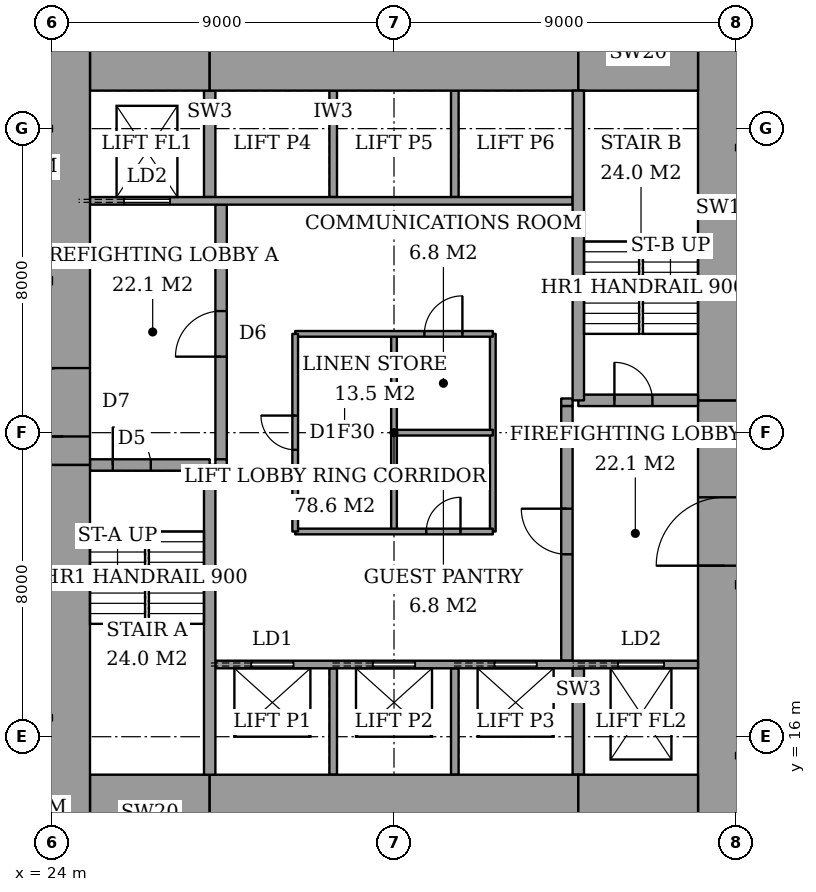
"""IFC4 building model, lengths in metres.
Left out: names, types, materials, properties, quantities, classifications, styles, units other than length and angle.
Written with IfcOpenShell. Run it as: python <this file> out.ifc"""

import sys

from ifc_helpers import new_model, si_unit, direction, frame, frame_2d, origin, place, context, subcontext, project, spatial, rectangle, extrude, element, fill, save


model = new_model("IFC4")
c1 = context("Model", 3, precision=1e-05, world=origin(), true_north=direction((0.0, 1.0)))
c2 = subcontext(c1, "Body", "Model", "MODEL_VIEW")
j1 = project(units=[si_unit("LENGTHUNIT", "METRE"), si_unit("PLANEANGLEUNIT", "RADIAN")], contexts=[c1])
p1 = place(None, origin())
s1 = spatial("IfcSite", under=j1, at=p1, CompositionType="ELEMENT")
p2 = place(p1, origin())
s2 = spatial("IfcBuilding", under=s1, at=p2, CompositionType="ELEMENT")
p3 = place(p2, frame((0.0, 0.0, 103.4)))
s3 = spatial("IfcBuildingStorey", under=s2, at=p3, CompositionType="ELEMENT", Elevation=103.4)
p4 = place(p3, frame((25.0, 14.0, 0.0), z_axis=(0.0, 0.0, 1.0), x_axis=(1.0, 0.0, 0.0)))
e1 = element("IfcWall", 1, at=p4, inside=s3, PredefinedType="SHEAR", context=c2, shape_type="SweptSolid", body=[
    extrude(rectangle(XDim=3.15, YDim=2.0, at=frame_2d((1.575, 0.0))), origin(), (0.0, 0.0, 1.0), 3.6),
])
p5 = place(p3, frame((28.15, 14.0, 0.0), z_axis=(0.0, 0.0, 1.0), x_axis=(1.0, 0.0, 0.0)))
e2 = element("IfcWall", 2, at=p5, inside=s3, PredefinedType="SHEAR", context=c2, shape_type="SweptSolid", body=[
    extrude(rectangle(XDim=9.7, YDim=2.0, at=frame_2d((4.85, 0.0))), origin(), (0.0, 0.0, 1.0), 3.6),
])
for number, where, z_axis, x_axis in (
    (3, (37.85, 14.0, 0.0), (0.0, 0.0, 1.0), (1.0, 0.0, 0.0)),
    (4, (25.0, 34.0, 0.0), (0.0, 0.0, 1.0), (1.0, 0.0, 0.0)),
):
    element("IfcWall", number, at=place(p3, frame(where, z_axis=z_axis, x_axis=x_axis)), inside=s3, PredefinedType="SHEAR", context=c2, shape_type="SweptSolid", body=[
        extrude(rectangle(XDim=3.15, YDim=2.0, at=frame_2d((1.575, 0.0))), origin(), (0.0, 0.0, 1.0), 3.6),
    ])
p6 = place(p3, frame((28.15, 34.0, 0.0), z_axis=(0.0, 0.0, 1.0), x_axis=(1.0, 0.0, 0.0)))
e5 = element("IfcWall", 5, at=p6, inside=s3, PredefinedType="SHEAR", context=c2, shape_type="SweptSolid", body=[
    extrude(rectangle(XDim=9.7, YDim=2.0, at=frame_2d((4.85, 0.0))), origin(), (0.0, 0.0, 1.0), 3.6),
])
p7 = place(p3, frame((37.85, 34.0, 0.0), z_axis=(0.0, 0.0, 1.0), x_axis=(1.0, 0.0, 0.0)))
e6 = element("IfcWall", 6, at=p7, inside=s3, PredefinedType="SHEAR", context=c2, shape_type="SweptSolid", body=[
    extrude(rectangle(XDim=3.15, YDim=2.0, at=frame_2d((1.575, 0.0))), origin(), (0.0, 0.0, 1.0), 3.6),
])
p8 = place(p3, frame((24.3, 13.0, 0.0), z_axis=(0.0, 0.0, 1.0), x_axis=(0.0, 1.0, 0.0)))
e7 = element("IfcWall", 7, at=p8, inside=s3, PredefinedType="SHEAR", context=c2, shape_type="SweptSolid", body=[
    extrude(rectangle(XDim=10.15, YDim=1.4, at=frame_2d((5.075, 0.0))), origin(), (0.0, 0.0, 1.0), 3.6),
])
p9 = place(p3, frame((24.3, 23.15, 0.0), z_axis=(0.0, 0.0, 1.0), x_axis=(0.0, 1.0, 0.0)))
e8 = element("IfcWall", 8, at=p9, inside=s3, PredefinedType="SHEAR", context=c2, shape_type="SweptSolid", body=[
    extrude(rectangle(XDim=11.85, YDim=1.4, at=frame_2d((5.925, 0.0))), origin(), (0.0, 0.0, 1.0), 3.6),
])
p10 = place(p9, frame((0.75, 0.0, 0.0)))
e9 = element("IfcOpeningElement", 9, at=p10, cuts=e8, PredefinedType="OPENING", context=c2, shape_type="SweptSolid", body=[
    extrude(rectangle(XDim=1.8, YDim=2.4, at=frame_2d((0.9, 1.2))), frame((0.0, 0.71, 0.0), z_axis=(0.0, -1.0, 0.0), x_axis=(1.0, 0.0, 0.0)), (0.0, 0.0, 1.0), 1.42),
])
p11 = place(p3, frame((41.7, 13.0, 0.0), z_axis=(0.0, 0.0, 1.0), x_axis=(0.0, 1.0, 0.0)))
e10 = element("IfcWall", 10, at=p11, inside=s3, PredefinedType="SHEAR", context=c2, shape_type="SweptSolid", body=[
    extrude(rectangle(XDim=11.85, YDim=1.4, at=frame_2d((5.925, 0.0))), origin(), (0.0, 0.0, 1.0), 3.6),
])
p12 = place(p11, frame((7.5, 0.0, 0.0)))
e11 = element("IfcOpeningElement", 11, at=p12, cuts=e10, PredefinedType="OPENING", context=c2, shape_type="SweptSolid", body=[
    extrude(rectangle(XDim=1.8, YDim=2.4, at=frame_2d((0.9, 1.2))), frame((0.0, 0.71, 0.0), z_axis=(0.0, -1.0, 0.0), x_axis=(1.0, 0.0, 0.0)), (0.0, 0.0, 1.0), 1.42),
])
p13 = place(p3, frame((41.7, 24.85, 0.0), z_axis=(0.0, 0.0, 1.0), x_axis=(0.0, 1.0, 0.0)))
e12 = element("IfcWall", 12, at=p13, inside=s3, PredefinedType="SHEAR", context=c2, shape_type="SweptSolid", body=[
    extrude(rectangle(XDim=10.15, YDim=1.4, at=frame_2d((5.075, 0.0))), origin(), (0.0, 0.0, 1.0), 3.6),
])
p14 = place(p3, frame((28.15, 15.0, 0.0), z_axis=(0.0, 0.0, 1.0), x_axis=(0.0, 1.0, 0.0)))
e13 = element("IfcWall", 13, at=p14, inside=s3, PredefinedType="SHEAR", context=c2, shape_type="SweptSolid", body=[
    extrude(rectangle(XDim=8.15, YDim=0.3, at=frame_2d((4.075, 0.0))), origin(), (0.0, 0.0, 1.0), 3.6),
])
p15 = place(p3, frame((25.0, 23.15, 0.0), z_axis=(0.0, 0.0, 1.0), x_axis=(1.0, 0.0, 0.0)))
e14 = element("IfcWall", 14, at=p15, inside=s3, PredefinedType="SHEAR", context=c2, shape_type="SweptSolid", body=[
    extrude(rectangle(XDim=3.15, YDim=0.3, at=frame_2d((1.575, 0.0))), origin(), (0.0, 0.0, 1.0), 3.6),
])
p16 = place(p15, frame((0.6, 0.0, 0.0)))
e15 = element("IfcOpeningElement", 15, at=p16, cuts=e14, PredefinedType="OPENING", context=c2, shape_type="SweptSolid", body=[
    extrude(rectangle(XDim=1.0, YDim=2.1, at=frame_2d((0.5, 1.05))), frame((0.0, 0.16, 0.0), z_axis=(0.0, -1.0, 0.0), x_axis=(1.0, 0.0, 0.0)), (0.0, 0.0, 1.0), 0.32),
])
p17 = place(p3, frame((37.85, 24.85, 0.0), z_axis=(0.0, 0.0, 1.0), x_axis=(0.0, 1.0, 0.0)))
e16 = element("IfcWall", 16, at=p17, inside=s3, PredefinedType="SHEAR", context=c2, shape_type="SweptSolid", body=[
    extrude(rectangle(XDim=8.15, YDim=0.3, at=frame_2d((4.075, 0.0))), origin(), (0.0, 0.0, 1.0), 3.6),
])
p18 = place(p3, frame((37.85, 24.85, 0.0), z_axis=(0.0, 0.0, 1.0), x_axis=(1.0, 0.0, 0.0)))
e17 = element("IfcWall", 17, at=p18, inside=s3, PredefinedType="SHEAR", context=c2, shape_type="SweptSolid", body=[
    extrude(rectangle(XDim=3.15, YDim=0.3, at=frame_2d((1.575, 0.0))), origin(), (0.0, 0.0, 1.0), 3.6),
])
p19 = place(p18, frame((0.95, 0.0, 0.0)))
e18 = element("IfcOpeningElement", 18, at=p19, cuts=e17, PredefinedType="OPENING", context=c2, shape_type="SweptSolid", body=[
    extrude(rectangle(XDim=1.0, YDim=2.1, at=frame_2d((0.5, 1.05))), frame((0.0, 0.16, 0.0), z_axis=(0.0, -1.0, 0.0), x_axis=(1.0, 0.0, 0.0)), (0.0, 0.0, 1.0), 0.32),
])
p20 = place(p3, frame((28.45, 23.3, 0.0), z_axis=(0.0, 0.0, 1.0), x_axis=(0.0, 1.0, 0.0)))
e19 = element("IfcWall", 19, at=p20, inside=s3, PredefinedType="PARTITIONING", context=c2, shape_type="SweptSolid", body=[
    extrude(rectangle(XDim=6.7, YDim=0.3, at=frame_2d((3.35, 0.0))), origin(), (0.0, 0.0, 1.0), 3.6),
])
p21 = place(p20, frame((2.7, 0.0, 0.0)))
e20 = element("IfcOpeningElement", 20, at=p21, cuts=e19, PredefinedType="OPENING", context=c2, shape_type="SweptSolid", body=[
    extrude(rectangle(XDim=1.2, YDim=2.1, at=frame_2d((0.6, 1.05))), frame((0.0, 0.16, 0.0), z_axis=(0.0, -1.0, 0.0), x_axis=(1.0, 0.0, 0.0)), (0.0, 0.0, 1.0), 0.32),
])
p22 = place(p3, frame((37.55, 18.0, 0.0), z_axis=(0.0, 0.0, 1.0), x_axis=(0.0, 1.0, 0.0)))
e21 = element("IfcWall", 21, at=p22, inside=s3, PredefinedType="PARTITIONING", context=c2, shape_type="SweptSolid", body=[
    extrude(rectangle(XDim=6.7, YDim=0.3, at=frame_2d((3.35, 0.0))), origin(), (0.0, 0.0, 1.0), 3.6),
])
p23 = place(p22, frame((2.8, 0.0, 0.0)))
e22 = element("IfcOpeningElement", 22, at=p23, cuts=e21, PredefinedType="OPENING", context=c2, shape_type="SweptSolid", body=[
    extrude(rectangle(XDim=1.2, YDim=2.1, at=frame_2d((0.6, 1.05))), frame((0.0, 0.16, 0.0), z_axis=(0.0, -1.0, 0.0), x_axis=(1.0, 0.0, 0.0)), (0.0, 0.0, 1.0), 0.32),
])
p24 = place(p3, frame((28.3, 17.9, 0.0), z_axis=(0.0, 0.0, 1.0), x_axis=(1.0, 0.0, 0.0)))
e23 = element("IfcWall", 23, at=p24, inside=s3, PredefinedType="PARTITIONING", context=c2, shape_type="SweptSolid", body=[
    extrude(rectangle(XDim=12.7, YDim=0.2, at=frame_2d((6.35, 0.0))), origin(), (0.0, 0.0, 1.0), 3.6),
])
p25 = place(p24, frame((0.95, 0.0, 0.0)))
e24 = element("IfcOpeningElement", 24, at=p25, cuts=e23, PredefinedType="OPENING", context=c2, shape_type="SweptSolid", body=[
    extrude(rectangle(XDim=1.1, YDim=2.1, at=frame_2d((0.55, 1.05))), frame((0.0, 0.11, 0.0), z_axis=(0.0, -1.0, 0.0), x_axis=(1.0, 0.0, 0.0)), (0.0, 0.0, 1.0), 0.22),
])
p26 = place(p24, frame((4.15, 0.0, 0.0)))
e25 = element("IfcOpeningElement", 25, at=p26, cuts=e23, PredefinedType="OPENING", context=c2, shape_type="SweptSolid", body=[
    extrude(rectangle(XDim=1.1, YDim=2.1, at=frame_2d((0.55, 1.05))), frame((0.0, 0.11, 0.0), z_axis=(0.0, -1.0, 0.0), x_axis=(1.0, 0.0, 0.0)), (0.0, 0.0, 1.0), 0.22),
])
p27 = place(p24, frame((7.35, 0.0, 0.0)))
e26 = element("IfcOpeningElement", 26, at=p27, cuts=e23, PredefinedType="OPENING", context=c2, shape_type="SweptSolid", body=[
    extrude(rectangle(XDim=1.1, YDim=2.1, at=frame_2d((0.55, 1.05))), frame((0.0, 0.11, 0.0), z_axis=(0.0, -1.0, 0.0), x_axis=(1.0, 0.0, 0.0)), (0.0, 0.0, 1.0), 0.22),
])
p28 = place(p24, frame((10.6, 0.0, 0.0)))
e27 = element("IfcOpeningElement", 27, at=p28, cuts=e23, PredefinedType="OPENING", context=c2, shape_type="SweptSolid", body=[
    extrude(rectangle(XDim=1.2, YDim=2.1, at=frame_2d((0.6, 1.05))), frame((0.0, 0.11, 0.0), z_axis=(0.0, -1.0, 0.0), x_axis=(1.0, 0.0, 0.0)), (0.0, 0.0, 1.0), 0.22),
])
p29 = place(p3, frame((25.0, 30.1, 0.0), z_axis=(0.0, 0.0, 1.0), x_axis=(1.0, 0.0, 0.0)))
e28 = element("IfcWall", 28, at=p29, inside=s3, PredefinedType="PARTITIONING", context=c2, shape_type="SweptSolid", body=[
    extrude(rectangle(XDim=12.7, YDim=0.2, at=frame_2d((6.35, 0.0))), origin(), (0.0, 0.0, 1.0), 3.6),
])
p30 = place(p29, frame((0.9, 0.0, 0.0)))
e29 = element("IfcOpeningElement", 29, at=p30, cuts=e28, PredefinedType="OPENING", context=c2, shape_type="SweptSolid", body=[
    extrude(rectangle(XDim=1.2, YDim=2.1, at=frame_2d((0.6, 1.05))), frame((0.0, 0.11, 0.0), z_axis=(0.0, -1.0, 0.0), x_axis=(1.0, 0.0, 0.0)), (0.0, 0.0, 1.0), 0.22),
])
for number, where, z_axis, x_axis in (
    (30, (31.4, 15.0, 0.0), (0.0, 0.0, 1.0), (0.0, 1.0, 0.0)),
    (31, (34.6, 15.0, 0.0), (0.0, 0.0, 1.0), (0.0, 1.0, 0.0)),
):
    element("IfcWall", number, at=place(p3, frame(where, z_axis=z_axis, x_axis=x_axis)), inside=s3, PredefinedType="PARTITIONING", context=c2, shape_type="SweptSolid", body=[
        extrude(rectangle(XDim=2.8, YDim=0.2, at=frame_2d((1.4, 0.0))), origin(), (0.0, 0.0, 1.0), 3.6),
    ])
p31 = place(p3, frame((37.85, 15.0, 0.0), z_axis=(0.0, 0.0, 1.0), x_axis=(0.0, 1.0, 0.0)))
e32 = element("IfcWall", 32, at=p31, inside=s3, PredefinedType="SHEAR", context=c2, shape_type="SweptSolid", body=[
    extrude(rectangle(XDim=2.8, YDim=0.3, at=frame_2d((1.4, 0.0))), origin(), (0.0, 0.0, 1.0), 3.6),
])
for number, where, z_axis, x_axis in (
    (33, (31.4, 30.2, 0.0), (0.0, 0.0, 1.0), (0.0, 1.0, 0.0)),
    (34, (34.6, 30.2, 0.0), (0.0, 0.0, 1.0), (0.0, 1.0, 0.0)),
):
    element("IfcWall", number, at=place(p3, frame(where, z_axis=z_axis, x_axis=x_axis)), inside=s3, PredefinedType="PARTITIONING", context=c2, shape_type="SweptSolid", body=[
        extrude(rectangle(XDim=2.8, YDim=0.2, at=frame_2d((1.4, 0.0))), origin(), (0.0, 0.0, 1.0), 3.6),
    ])
p32 = place(p3, frame((28.15, 30.2, 0.0), z_axis=(0.0, 0.0, 1.0), x_axis=(0.0, 1.0, 0.0)))
e35 = element("IfcWall", 35, at=p32, inside=s3, PredefinedType="SHEAR", context=c2, shape_type="SweptSolid", body=[
    extrude(rectangle(XDim=2.8, YDim=0.3, at=frame_2d((1.4, 0.0))), origin(), (0.0, 0.0, 1.0), 3.6),
])
for number, where, z_axis, x_axis in (
    (36, (28.3, 23.2, 0.0), (0.0, 0.0, 1.0), (1.0, 0.0, 0.0)),
    (37, (37.4, 24.8, 0.0), (0.0, 0.0, 1.0), (1.0, 0.0, 0.0)),
):
    element("IfcWall", number, at=place(p3, frame(where, z_axis=z_axis, x_axis=x_axis)), inside=s3, PredefinedType="PARTITIONING", context=c2, shape_type="SweptSolid", body=[
        extrude(rectangle(XDim=0.3, YDim=0.2, at=frame_2d((0.15, 0.0))), origin(), (0.0, 0.0, 1.0), 3.6),
    ])
p33 = place(p3, frame((30.4, 21.4, 0.0), z_axis=(0.0, 0.0, 1.0), x_axis=(1.0, 0.0, 0.0)))
e38 = element("IfcWall", 38, at=p33, inside=s3, PredefinedType="PARTITIONING", context=c2, shape_type="SweptSolid", body=[
    extrude(rectangle(XDim=5.2, YDim=0.15, at=frame_2d((2.6, 0.0))), origin(), (0.0, 0.0, 1.0), 3.35),
])
p34 = place(p33, frame((3.45, 0.0, 0.0)))
e39 = element("IfcOpeningElement", 39, at=p34, cuts=e38, PredefinedType="OPENING", context=c2, shape_type="SweptSolid", body=[
    extrude(rectangle(XDim=0.9, YDim=2.1, at=frame_2d((0.45, 1.05))), frame((0.0, 0.085, 0.0), z_axis=(0.0, -1.0, 0.0), x_axis=(1.0, 0.0, 0.0)), (0.0, 0.0, 1.0), 0.17),
])
p35 = place(p3, frame((30.4, 26.6, 0.0), z_axis=(0.0, 0.0, 1.0), x_axis=(1.0, 0.0, 0.0)))
e40 = element("IfcWall", 40, at=p35, inside=s3, PredefinedType="PARTITIONING", context=c2, shape_type="SweptSolid", body=[
    extrude(rectangle(XDim=5.2, YDim=0.15, at=frame_2d((2.6, 0.0))), origin(), (0.0, 0.0, 1.0), 3.35),
])
p36 = place(p35, frame((3.4, 0.0, 0.0)))
e41 = element("IfcOpeningElement", 41, at=p36, cuts=e40, PredefinedType="OPENING", context=c2, shape_type="SweptSolid", body=[
    extrude(rectangle(XDim=1.0, YDim=2.1, at=frame_2d((0.5, 1.05))), frame((0.0, 0.085, 0.0), z_axis=(0.0, -1.0, 0.0), x_axis=(1.0, 0.0, 0.0)), (0.0, 0.0, 1.0), 0.17),
])
p37 = place(p3, frame((30.4, 21.4, 0.0), z_axis=(0.0, 0.0, 1.0), x_axis=(0.0, 1.0, 0.0)))
e42 = element("IfcWall", 42, at=p37, inside=s3, PredefinedType="PARTITIONING", context=c2, shape_type="SweptSolid", body=[
    extrude(rectangle(XDim=5.2, YDim=0.15, at=frame_2d((2.6, 0.0))), origin(), (0.0, 0.0, 1.0), 3.35),
])
p38 = place(p37, frame((2.15, 0.0, 0.0)))
e43 = element("IfcOpeningElement", 43, at=p38, cuts=e42, PredefinedType="OPENING", context=c2, shape_type="SweptSolid", body=[
    extrude(rectangle(XDim=0.9, YDim=2.1, at=frame_2d((0.45, 1.05))), frame((0.0, 0.085, 0.0), z_axis=(0.0, -1.0, 0.0), x_axis=(1.0, 0.0, 0.0)), (0.0, 0.0, 1.0), 0.17),
])
p39 = place(p3, frame((35.6, 21.4, 0.0), z_axis=(0.0, 0.0, 1.0), x_axis=(0.0, 1.0, 0.0)))
e44 = element("IfcWall", 44, at=p39, inside=s3, PredefinedType="PARTITIONING", context=c2, shape_type="SweptSolid", body=[
    extrude(rectangle(XDim=5.2, YDim=0.15, at=frame_2d((2.6, 0.0))), origin(), (0.0, 0.0, 1.0), 3.35),
])
p40 = place(p3, frame((33.0, 24.0, 0.0), z_axis=(0.0, 0.0, 1.0), x_axis=(1.0, 0.0, 0.0)))
e45 = element("IfcWall", 45, at=p40, inside=s3, PredefinedType="PARTITIONING", context=c2, shape_type="SweptSolid", body=[
    extrude(rectangle(XDim=2.6, YDim=0.15, at=frame_2d((1.3, 0.0))), origin(), (0.0, 0.0, 1.0), 3.35),
])
p41 = place(p3, frame((33.0, 21.4, 0.0), z_axis=(0.0, 0.0, 1.0), x_axis=(0.0, 1.0, 0.0)))
e46 = element("IfcWall", 46, at=p41, inside=s3, PredefinedType="PARTITIONING", context=c2, shape_type="SweptSolid", body=[
    extrude(rectangle(XDim=5.2, YDim=0.15, at=frame_2d((2.6, 0.0))), origin(), (0.0, 0.0, 1.0), 3.35),
])
p42 = place(p16, origin())
e47 = element("IfcDoor", 47, at=p42, inside=s3, OperationType="SINGLE_SWING_RIGHT", PredefinedType="DOOR", context=c2, shape_type="SweptSolid", body=[
    extrude(rectangle(XDim=1.0, YDim=2.1, at=frame_2d((0.5, 1.05))), frame((0.0, 0.025, 0.0), z_axis=(0.0, -1.0, 0.0), x_axis=(1.0, 0.0, 0.0)), (0.0, 0.0, 1.0), 0.05),
])
fill(e15, e47)
p43 = place(p19, origin())
e48 = element("IfcDoor", 48, at=p43, inside=s3, OperationType="SINGLE_SWING_RIGHT", PredefinedType="DOOR", context=c2, shape_type="SweptSolid", body=[
    extrude(rectangle(XDim=1.0, YDim=2.1, at=frame_2d((0.5, 1.05))), frame((0.0, 0.025, 0.0), z_axis=(0.0, -1.0, 0.0), x_axis=(1.0, 0.0, 0.0)), (0.0, 0.0, 1.0), 0.05),
])
fill(e18, e48)
p44 = place(p21, origin())
e49 = element("IfcDoor", 49, at=p44, inside=s3, OperationType="SINGLE_SWING_RIGHT", PredefinedType="DOOR", context=c2, shape_type="SweptSolid", body=[
    extrude(rectangle(XDim=1.2, YDim=2.1, at=frame_2d((0.6, 1.05))), frame((0.0, 0.025, 0.0), z_axis=(0.0, -1.0, 0.0), x_axis=(1.0, 0.0, 0.0)), (0.0, 0.0, 1.0), 0.05),
])
fill(e20, e49)
p45 = place(p23, origin())
e50 = element("IfcDoor", 50, at=p45, inside=s3, OperationType="SINGLE_SWING_LEFT", PredefinedType="DOOR", context=c2, shape_type="SweptSolid", body=[
    extrude(rectangle(XDim=1.2, YDim=2.1, at=frame_2d((0.6, 1.05))), frame((0.0, 0.025, 0.0), z_axis=(0.0, -1.0, 0.0), x_axis=(1.0, 0.0, 0.0)), (0.0, 0.0, 1.0), 0.05),
])
fill(e22, e50)
p46 = place(p10, origin())
e51 = element("IfcDoor", 51, at=p46, inside=s3, OperationType="DOUBLE_DOOR_DOUBLE_SWING", PredefinedType="DOOR", context=c2, shape_type="SweptSolid", body=[
    extrude(rectangle(XDim=1.8, YDim=2.4, at=frame_2d((0.9, 1.2))), frame((0.0, 0.025, 0.0), z_axis=(0.0, -1.0, 0.0), x_axis=(1.0, 0.0, 0.0)), (0.0, 0.0, 1.0), 0.05),
])
fill(e9, e51)
p47 = place(p12, origin())
e52 = element("IfcDoor", 52, at=p47, inside=s3, OperationType="DOUBLE_DOOR_DOUBLE_SWING", PredefinedType="DOOR", context=c2, shape_type="SweptSolid", body=[
    extrude(rectangle(XDim=1.8, YDim=2.4, at=frame_2d((0.9, 1.2))), frame((0.0, 0.025, 0.0), z_axis=(0.0, -1.0, 0.0), x_axis=(1.0, 0.0, 0.0)), (0.0, 0.0, 1.0), 0.05),
])
fill(e11, e52)
p48 = place(p38, origin())
e53 = element("IfcDoor", 53, at=p48, inside=s3, OperationType="SINGLE_SWING_LEFT", PredefinedType="DOOR", context=c2, shape_type="SweptSolid", body=[
    extrude(rectangle(XDim=0.9, YDim=2.1, at=frame_2d((0.45, 1.05))), frame((0.0, 0.025, 0.0), z_axis=(0.0, -1.0, 0.0), x_axis=(1.0, 0.0, 0.0)), (0.0, 0.0, 1.0), 0.05),
])
fill(e43, e53)
p49 = place(p34, origin())
e54 = element("IfcDoor", 54, at=p49, inside=s3, OperationType="SINGLE_SWING_LEFT", PredefinedType="DOOR", context=c2, shape_type="SweptSolid", body=[
    extrude(rectangle(XDim=0.9, YDim=2.1, at=frame_2d((0.45, 1.05))), frame((0.0, 0.025, 0.0), z_axis=(0.0, -1.0, 0.0), x_axis=(1.0, 0.0, 0.0)), (0.0, 0.0, 1.0), 0.05),
])
fill(e39, e54)
p50 = place(p36, origin())
e55 = element("IfcDoor", 55, at=p50, inside=s3, OperationType="SINGLE_SWING_LEFT", PredefinedType="DOOR", context=c2, shape_type="SweptSolid", body=[
    extrude(rectangle(XDim=1.0, YDim=2.1, at=frame_2d((0.5, 1.05))), frame((0.0, 0.025, 0.0), z_axis=(0.0, -1.0, 0.0), x_axis=(1.0, 0.0, 0.0)), (0.0, 0.0, 1.0), 0.05),
])
fill(e41, e55)
p51 = place(p25, origin())
e56 = element("IfcDoor", 56, at=p51, inside=s3, OperationType="SLIDING_TO_LEFT", PredefinedType="DOOR", context=c2, shape_type="SweptSolid", body=[
    extrude(rectangle(XDim=1.1, YDim=2.1, at=frame_2d((0.55, 1.05))), frame((0.0, 0.025, 0.0), z_axis=(0.0, -1.0, 0.0), x_axis=(1.0, 0.0, 0.0)), (0.0, 0.0, 1.0), 0.05),
])
fill(e24, e56)
p52 = place(p26, origin())
e57 = element("IfcDoor", 57, at=p52, inside=s3, OperationType="SLIDING_TO_LEFT", PredefinedType="DOOR", context=c2, shape_type="SweptSolid", body=[
    extrude(rectangle(XDim=1.1, YDim=2.1, at=frame_2d((0.55, 1.05))), frame((0.0, 0.025, 0.0), z_axis=(0.0, -1.0, 0.0), x_axis=(1.0, 0.0, 0.0)), (0.0, 0.0, 1.0), 0.05),
])
fill(e25, e57)
p53 = place(p27, origin())
e58 = element("IfcDoor", 58, at=p53, inside=s3, OperationType="SLIDING_TO_LEFT", PredefinedType="DOOR", context=c2, shape_type="SweptSolid", body=[
    extrude(rectangle(XDim=1.1, YDim=2.1, at=frame_2d((0.55, 1.05))), frame((0.0, 0.025, 0.0), z_axis=(0.0, -1.0, 0.0), x_axis=(1.0, 0.0, 0.0)), (0.0, 0.0, 1.0), 0.05),
])
fill(e26, e58)
p54 = place(p30, origin())
e59 = element("IfcDoor", 59, at=p54, inside=s3, OperationType="SLIDING_TO_LEFT", PredefinedType="DOOR", context=c2, shape_type="SweptSolid", body=[
    extrude(rectangle(XDim=1.2, YDim=2.1, at=frame_2d((0.6, 1.05))), frame((0.0, 0.025, 0.0), z_axis=(0.0, -1.0, 0.0), x_axis=(1.0, 0.0, 0.0)), (0.0, 0.0, 1.0), 0.05),
])
fill(e29, e59)
p55 = place(p28, origin())
e60 = element("IfcDoor", 60, at=p55, inside=s3, OperationType="SLIDING_TO_LEFT", PredefinedType="DOOR", context=c2, shape_type="SweptSolid", body=[
    extrude(rectangle(XDim=1.2, YDim=2.1, at=frame_2d((0.6, 1.05))), frame((0.0, 0.025, 0.0), z_axis=(0.0, -1.0, 0.0), x_axis=(1.0, 0.0, 0.0)), (0.0, 0.0, 1.0), 0.05),
])
fill(e27, e60)
save(model, sys.argv[1])
